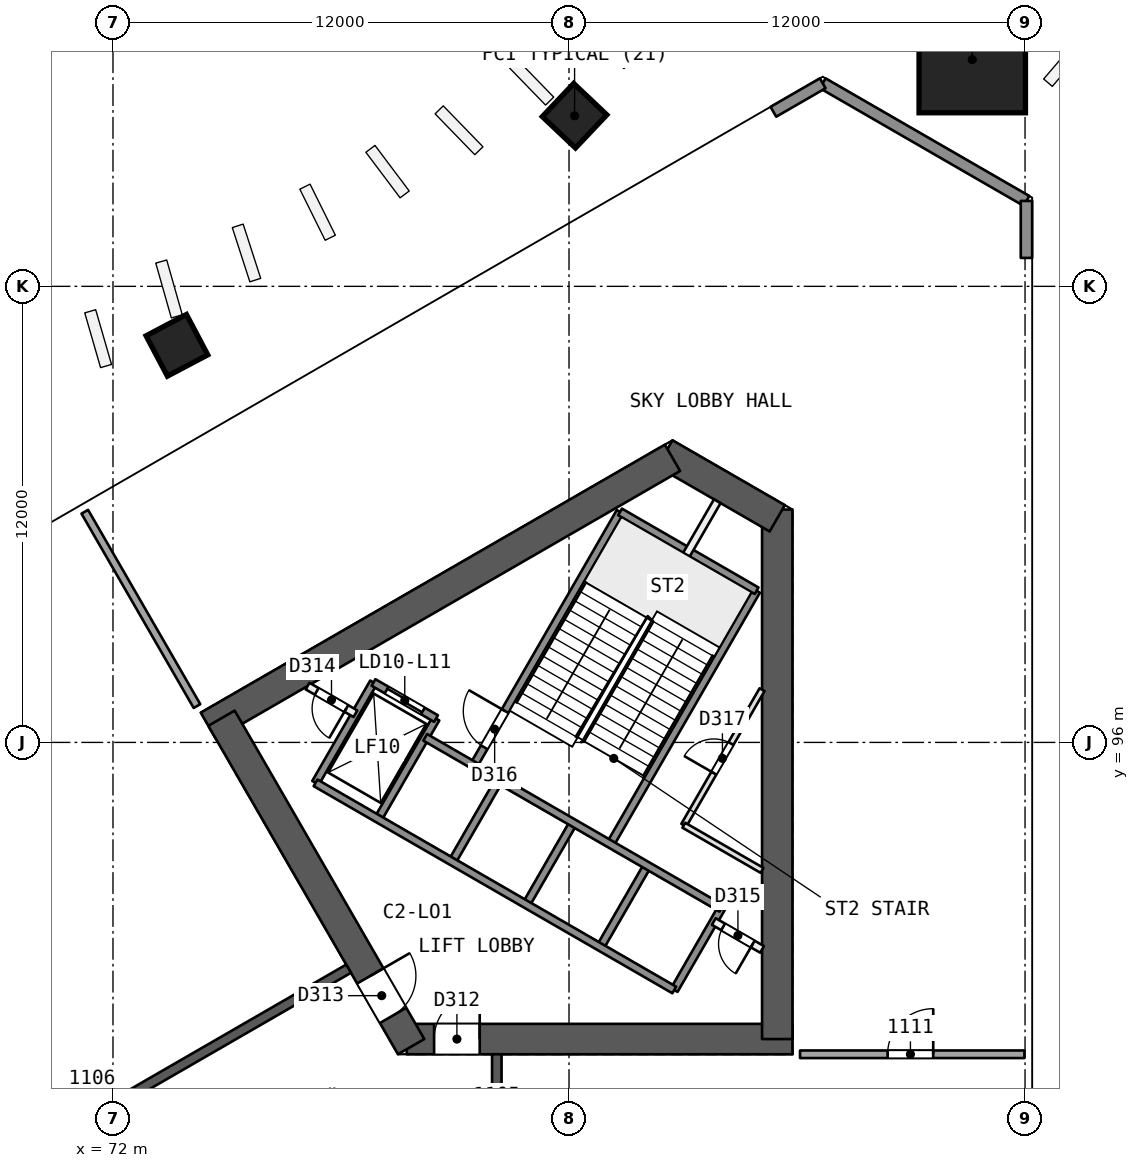
"""IFC4 building model, lengths in metres.
Left out: names, types, materials, properties, quantities, classifications, styles, units other than length and angle.
Written with IfcOpenShell. Run it as: python <this file> out.ifc"""

import sys

from ifc_helpers import new_model, si_unit, direction, frame, frame_2d, origin, origin_2d, place, context, subcontext, project, spatial, rectangle, extrude, element, fill, save


model = new_model("IFC4")
c1 = context("Model", 3, precision=1e-05, world=origin(), true_north=direction((0.0, 1.0)))
c2 = subcontext(c1, "Body", "Model", "MODEL_VIEW")
j1 = project(units=[si_unit("LENGTHUNIT", "METRE"), si_unit("PLANEANGLEUNIT", "RADIAN")], contexts=[c1])
p1 = place(None, origin())
s1 = spatial("IfcSite", under=j1, at=p1, CompositionType="ELEMENT")
p2 = place(p1, origin())
s2 = spatial("IfcBuilding", under=s1, at=p2, CompositionType="ELEMENT")
p3 = place(p2, frame((0.0, 0.0, 52.9)))
s3 = spatial("IfcBuildingStorey", under=s2, at=p3, CompositionType="ELEMENT", Elevation=52.9)
p4 = place(p3, frame((79.731, 88.194, 0.0), z_axis=(0.0, 0.0, 1.0), x_axis=(1.0, 0.0, 0.0)))
e1 = element("IfcWall", 1, at=p4, inside=s3, PredefinedType="SHEAR", context=c2, shape_type="SweptSolid", body=[
    extrude(rectangle(XDim=10.149, YDim=0.8, at=frame_2d((5.074, 0.0))), origin(), (0.0, 0.0, 1.0), 4.4),
])
p5 = place(p4, frame((0.719, 0.0, 0.0)))
e2 = element("IfcOpeningElement", 2, at=p5, cuts=e1, PredefinedType="OPENING", context=c2, shape_type="SweptSolid", body=[
    extrude(rectangle(XDim=1.2, YDim=2.1, at=frame_2d((0.6, 1.05))), frame((0.0, 0.411, 0.0), z_axis=(0.0, -1.0, 0.0), x_axis=(1.0, 0.0, 0.0)), (0.0, 0.0, 1.0), 0.821),
])
p6 = place(p3, frame((89.48, 88.194, 0.0), z_axis=(0.0, 0.0, 1.0), x_axis=(0.0, 1.0, 0.0)))
e3 = element("IfcWall", 3, at=p6, inside=s3, PredefinedType="SHEAR", context=c2, shape_type="SweptSolid", body=[
    extrude(rectangle(XDim=13.933, YDim=0.8, at=frame_2d((6.967, 0.0))), origin(), (0.0, 0.0, 1.0), 4.4),
])
p7 = place(p3, frame((89.48, 101.897, 0.0), z_axis=(0.0, 0.0, 1.0), x_axis=(-0.866034355626, 0.499984494636, 0.0)))
e4 = element("IfcWall", 4, at=p7, inside=s3, PredefinedType="SHEAR", context=c2, shape_type="SweptSolid", body=[
    extrude(rectangle(XDim=3.414, YDim=0.8, at=frame_2d((1.707, 0.0))), origin(), (0.0, 0.0, 1.0), 4.4),
])
p8 = place(p3, frame((86.723, 103.488, 0.0), z_axis=(0.0, 0.0, 1.0), x_axis=(-0.866032504327, -0.499987701298, 0.0)))
e5 = element("IfcWall", 5, at=p8, inside=s3, PredefinedType="SHEAR", context=c2, shape_type="SweptSolid", body=[
    extrude(rectangle(XDim=14.102, YDim=0.8, at=frame_2d((7.051, 0.0))), origin(), (0.0, 0.0, 1.0), 4.4),
])
p9 = place(p3, frame((74.856, 96.637, 0.0), z_axis=(0.0, 0.0, 1.0), x_axis=(0.499993500917, -0.866029155999, 0.0)))
e6 = element("IfcWall", 6, at=p9, inside=s3, PredefinedType="SHEAR", context=c2, shape_type="SweptSolid", body=[
    extrude(rectangle(XDim=9.98, YDim=0.8, at=frame_2d((4.99, 0.0))), origin(), (0.0, 0.0, 1.0), 4.4),
])
p10 = place(p9, frame((7.83, 0.0, 0.0)))
e7 = element("IfcOpeningElement", 7, at=p10, cuts=e6, PredefinedType="OPENING", context=c2, shape_type="SweptSolid", body=[
    extrude(rectangle(XDim=1.2, YDim=2.1, at=frame_2d((0.6, 1.05))), frame((0.0, 0.411, 0.0), z_axis=(0.0, -1.0, 0.0), x_axis=(1.0, 0.0, 0.0)), (0.0, 0.0, 1.0), 0.821),
])
p11 = place(p3, frame((82.1, 72.206, 0.0), z_axis=(0.0, 0.0, 1.0), x_axis=(0.0, 1.0, 0.0)))
e8 = element("IfcWall", 8, at=p11, inside=s3, PredefinedType="SHEAR", context=c2, shape_type="SweptSolid", body=[
    extrude(rectangle(XDim=15.588, YDim=0.25, at=frame_2d((7.794, 0.0))), origin(), (0.0, 0.0, 1.0), 3.9),
])
p12 = place(p11, frame((2.518, 0.0, 0.0)))
e9 = element("IfcOpeningElement", 9, at=p12, cuts=e8, PredefinedType="OPENING", context=c2, shape_type="SweptSolid", body=[
    extrude(rectangle(XDim=1.2, YDim=2.4, at=frame_2d((0.6, 1.2))), frame((0.0, 0.135, 0.0), z_axis=(0.0, -1.0, 0.0), x_axis=(1.0, 0.0, 0.0)), (0.0, 0.0, 1.0), 0.271),
])
p13 = place(p11, frame((6.487, 0.0, 0.0)))
e10 = element("IfcOpeningElement", 10, at=p13, cuts=e8, PredefinedType="OPENING", context=c2, shape_type="SweptSolid", body=[
    extrude(rectangle(XDim=0.9, YDim=2.1, at=frame_2d((0.45, 1.05))), frame((0.0, 0.135, 0.0), z_axis=(0.0, -1.0, 0.0), x_axis=(1.0, 0.0, 0.0)), (0.0, 0.0, 1.0), 0.271),
])
p14 = place(p11, frame((7.89, 0.0, 0.0)))
e11 = element("IfcOpeningElement", 11, at=p14, cuts=e8, PredefinedType="OPENING", context=c2, shape_type="SweptSolid", body=[
    extrude(rectangle(XDim=0.9, YDim=2.1, at=frame_2d((0.45, 1.05))), frame((0.0, 0.135, 0.0), z_axis=(0.0, -1.0, 0.0), x_axis=(1.0, 0.0, 0.0)), (0.0, 0.0, 1.0), 0.271),
])
p15 = place(p11, frame((9.527, 0.0, 0.0)))
e12 = element("IfcOpeningElement", 12, at=p15, cuts=e8, PredefinedType="OPENING", context=c2, shape_type="SweptSolid", body=[
    extrude(rectangle(XDim=0.9, YDim=2.1, at=frame_2d((0.45, 1.05))), frame((0.0, 0.135, 0.0), z_axis=(0.0, -1.0, 0.0), x_axis=(1.0, 0.0, 0.0)), (0.0, 0.0, 1.0), 0.271),
])
p16 = place(p11, frame((12.65, 0.0, 0.0)))
e13 = element("IfcOpeningElement", 13, at=p16, cuts=e8, PredefinedType="OPENING", context=c2, shape_type="SweptSolid", body=[
    extrude(rectangle(XDim=1.2, YDim=2.4, at=frame_2d((0.6, 1.2))), frame((0.0, 0.135, 0.0), z_axis=(0.0, -1.0, 0.0), x_axis=(1.0, 0.0, 0.0)), (0.0, 0.0, 1.0), 0.271),
])
p17 = place(p3, frame((78.2, 90.046, 0.0), z_axis=(0.0, 0.0, 1.0), x_axis=(-0.866026492143, -0.499998114903, 0.0)))
e14 = element("IfcWall", 14, at=p17, inside=s3, PredefinedType="SHEAR", context=c2, shape_type="SweptSolid", body=[
    extrude(rectangle(XDim=15.588, YDim=0.25, at=frame_2d((7.794, 0.0))), origin(), (0.0, 0.0, 1.0), 3.9),
])
p18 = place(p17, frame((7.194, 0.0, 0.0)))
e15 = element("IfcOpeningElement", 15, at=p18, cuts=e14, PredefinedType="OPENING", context=c2, shape_type="SweptSolid", body=[
    extrude(rectangle(XDim=1.2, YDim=2.4, at=frame_2d((0.6, 1.2))), frame((0.0, 0.135, 0.0), z_axis=(0.0, -1.0, 0.0), x_axis=(1.0, 0.0, 0.0)), (0.0, 0.0, 1.0), 0.271),
])
p19 = place(p3, frame((94.632, 114.004, 0.0), z_axis=(-0.017577766169, -0.030442251188, 0.99938195475), x_axis=(0.49973347244, 0.865465624969, 0.035152646001)))
e16 = element("IfcColumn", 16, at=p19, inside=s3, PredefinedType="COLUMN", context=c2, shape_type="SweptSolid", body=[
    extrude(rectangle(XDim=2.8, YDim=2.8, at=origin_2d()), origin(), (0.0, 0.0, 1.0), 4.403),
])
p20 = place(p3, frame((84.157, 112.523, 0.0), z_axis=(-0.008374563655, -0.028174028721, 0.999567952062), x_axis=(0.865767069895, 0.499991710759, 0.021346424936)))
e17 = element("IfcColumn", 17, at=p20, inside=s3, PredefinedType="COLUMN", context=c2, shape_type="SweptSolid", body=[
    extrude(rectangle(XDim=1.2, YDim=1.2, at=origin_2d()), origin(), (0.0, 0.0, 1.0), 4.402),
])
p21 = place(p3, frame((73.681, 106.475, 0.0), z_axis=(0.000887523446, -0.022798258525, 0.999739691975), x_axis=(0.865376704776, 0.501008573055, 0.010656854921)))
e18 = element("IfcColumn", 18, at=p21, inside=s3, PredefinedType="COLUMN", context=c2, shape_type="SweptSolid", body=[
    extrude(rectangle(XDim=1.2, YDim=1.2, at=origin_2d()), origin(), (0.0, 0.0, 1.0), 4.401),
])
p22 = place(p3, frame((90.079, 87.794, 0.0), z_axis=(0.0, 0.0, 1.0), x_axis=(1.0, 0.0, 0.0)))
e19 = element("IfcWall", 19, at=p22, inside=s3, PredefinedType="PARTITIONING", context=c2, shape_type="SweptSolid", body=[
    extrude(rectangle(XDim=5.905, YDim=0.2, at=frame_2d((2.952, 0.0))), origin(), (0.0, 0.0, 1.0), 3.9),
])
p23 = place(p22, frame((2.305, 0.0, 0.0)))
e20 = element("IfcOpeningElement", 20, at=p23, cuts=e19, PredefinedType="OPENING", context=c2, shape_type="SweptSolid", body=[
    extrude(rectangle(XDim=1.2, YDim=2.4, at=frame_2d((0.6, 1.2))), frame((0.0, 0.11, 0.0), z_axis=(0.0, -1.0, 0.0), x_axis=(1.0, 0.0, 0.0)), (0.0, 0.0, 1.0), 0.221),
])
p24 = place(p3, frame((71.258, 102.07, 0.0), z_axis=(0.0, 0.0, 1.0), x_axis=(0.49999445743, -0.866028603765, 0.0)))
e21 = element("IfcWall", 21, at=p24, inside=s3, PredefinedType="PARTITIONING", context=c2, shape_type="SweptSolid", body=[
    extrude(rectangle(XDim=5.905, YDim=0.2, at=frame_2d((2.952, 0.0))), origin(), (0.0, 0.0, 1.0), 3.9),
])
p25 = place(p3, frame((90.677, 113.343, 0.0), z_axis=(0.0, 0.0, 1.0), x_axis=(0.866025993994, -0.499998977725, 0.0)))
e22 = element("IfcWall", 22, at=p25, inside=s3, PredefinedType="SOLIDWALL", context=c2, shape_type="SweptSolid", body=[
    extrude(rectangle(XDim=6.19, YDim=0.3, at=frame_2d((3.095, 0.0))), origin(), (0.0, 0.0, 1.0), 3.9),
])
for number, where, z_axis, x_axis in (
    (23, (96.038, 110.248, 0.0), (0.0, 0.0, 1.0), (0.0, -1.0, 0.0)),
    (24, (89.377, 112.593, 0.0), (0.0, 0.0, 1.0), (0.866, 0.5, 0.0)),
):
    element("IfcWall", number, at=place(p3, frame(where, z_axis=z_axis, x_axis=x_axis)), inside=s3, PredefinedType="SOLIDWALL", context=c2, shape_type="SweptSolid", body=[
        extrude(rectangle(XDim=1.5, YDim=0.3, at=frame_2d((0.75, 0.0))), origin(), (0.0, 0.0, 1.0), 3.9),
    ])
p26 = place(p3, frame((86.77, 89.486, 0.0), z_axis=(0.0, 0.0, 1.0), x_axis=(0.499961042966, 0.86604789447, 0.0)))
e25 = element("IfcWall", 25, at=p26, inside=s3, PredefinedType="SOLIDWALL", context=c2, shape_type="SweptSolid", body=[
    extrude(rectangle(XDim=2.48, YDim=0.2, at=frame_2d((1.24, 0.0))), origin(), (0.0, 0.0, 1.0), 3.9),
])
p27 = place(p3, frame((87.021, 93.821, 0.0), z_axis=(0.0, 0.0, 1.0), x_axis=(0.500028662945, 0.866008854593, 0.0)))
e26 = element("IfcWall", 26, at=p27, inside=s3, PredefinedType="PARTITIONING", context=c2, shape_type="SweptSolid", body=[
    extrude(rectangle(XDim=4.118, YDim=0.15, at=frame_2d((2.059, 0.0))), origin(), (0.0, 0.0, 1.0), 3.9),
])
p28 = place(p27, frame((1.582, 0.0, 0.0)))
e27 = element("IfcOpeningElement", 27, at=p28, cuts=e26, PredefinedType="OPENING", context=c2, shape_type="SweptSolid", body=[
    extrude(rectangle(XDim=0.9, YDim=2.1, at=frame_2d((0.45, 1.05))), frame((0.0, 0.085, 0.0), z_axis=(0.0, -1.0, 0.0), x_axis=(1.0, 0.0, 0.0)), (0.0, 0.0, 1.0), 0.171),
])
p29 = place(p3, frame((84.821, 90.611, 0.0), z_axis=(0.0, 0.0, 1.0), x_axis=(0.499961042966, 0.86604789447, 0.0)))
e28 = element("IfcWall", 28, at=p29, inside=s3, PredefinedType="SOLIDWALL", context=c2, shape_type="SweptSolid", body=[
    extrude(rectangle(XDim=2.48, YDim=0.2, at=frame_2d((1.24, 0.0))), origin(), (0.0, 0.0, 1.0), 3.9),
])
p30 = place(p3, frame((85.087, 93.321, 0.0), z_axis=(0.0, 0.0, 1.0), x_axis=(0.500019787375, 0.866013979237, 0.0)))
e29 = element("IfcWall", 29, at=p30, inside=s3, PredefinedType="SOLIDWALL", context=c2, shape_type="SweptSolid", body=[
    extrude(rectangle(XDim=7.7, YDim=0.2, at=frame_2d((3.85, 0.0))), origin(), (0.0, 0.0, 1.0), 3.9),
])
p31 = place(p3, frame((82.873, 91.736, 0.0), z_axis=(0.0, 0.0, 1.0), x_axis=(0.499961042966, 0.86604789447, 0.0)))
e30 = element("IfcWall", 30, at=p31, inside=s3, PredefinedType="SOLIDWALL", context=c2, shape_type="SweptSolid", body=[
    extrude(rectangle(XDim=2.48, YDim=0.2, at=frame_2d((1.24, 0.0))), origin(), (0.0, 0.0, 1.0), 3.9),
])
p32 = place(p3, frame((87.09, 100.94, 0.0), z_axis=(0.0, 0.0, 1.0), x_axis=(0.499956811548, 0.866050337213, 0.0)))
e31 = element("IfcWall", 31, at=p32, inside=s3, PredefinedType="PARTITIONING", context=c2, shape_type="SweptSolid", body=[
    extrude(rectangle(XDim=1.623, YDim=0.2, at=frame_2d((0.812, 0.0))), origin(), (0.0, 0.0, 1.0), 3.9),
])
p33 = place(p3, frame((80.924, 92.861, 0.0), z_axis=(0.0, 0.0, 1.0), x_axis=(0.499961042966, 0.86604789447, 0.0)))
e32 = element("IfcWall", 32, at=p33, inside=s3, PredefinedType="SOLIDWALL", context=c2, shape_type="SweptSolid", body=[
    extrude(rectangle(XDim=2.48, YDim=0.2, at=frame_2d((1.24, 0.0))), origin(), (0.0, 0.0, 1.0), 3.9),
])
p34 = place(p3, frame((81.493, 95.396, 0.0), z_axis=(0.0, 0.0, 1.0), x_axis=(0.500006057782, 0.866021906294, 0.0)))
e33 = element("IfcWall", 33, at=p34, inside=s3, PredefinedType="SOLIDWALL", context=c2, shape_type="SweptSolid", body=[
    extrude(rectangle(XDim=7.7, YDim=0.2, at=frame_2d((3.85, 0.0))), origin(), (0.0, 0.0, 1.0), 3.9),
])
p35 = place(p34, frame((0.55, 0.0, 0.0)))
e34 = element("IfcOpeningElement", 34, at=p35, cuts=e33, PredefinedType="OPENING", context=c2, shape_type="SweptSolid", body=[
    extrude(rectangle(XDim=1.1, YDim=2.1, at=frame_2d((0.55, 1.05))), frame((0.0, 0.11, 0.0), z_axis=(0.0, -1.0, 0.0), x_axis=(1.0, 0.0, 0.0)), (0.0, 0.0, 1.0), 0.221),
])
for number, where, z_axis, x_axis in (
    (35, (78.976, 93.986, 0.0), (0.0, 0.0, 1.0), (0.5, 0.866, 0.0)),
    (36, (77.33, 94.936, 0.0), (0.0, 0.0, 1.0), (0.5, 0.866, 0.0)),
):
    element("IfcWall", number, at=place(p3, frame(where, z_axis=z_axis, x_axis=x_axis)), inside=s3, PredefinedType="SOLIDWALL", context=c2, shape_type="SweptSolid", body=[
        extrude(rectangle(XDim=3.05, YDim=0.2, at=frame_2d((1.525, 0.0))), origin(), (0.0, 0.0, 1.0), 3.9),
    ])
p36 = place(p3, frame((86.77, 89.486, 0.0), z_axis=(0.0, 0.0, 1.0), x_axis=(-0.86601811187, 0.500012629753, 0.0)))
e37 = element("IfcWall", 37, at=p36, inside=s3, PredefinedType="SOLIDWALL", context=c2, shape_type="SweptSolid", body=[
    extrude(rectangle(XDim=10.9, YDim=0.2, at=frame_2d((5.45, 0.0))), origin(), (0.0, 0.0, 1.0), 3.9),
])
p37 = place(p3, frame((89.08, 90.554, 0.0), z_axis=(0.0, 0.0, 1.0), x_axis=(-0.866022048785, 0.500005810984, 0.0)))
e38 = element("IfcWall", 38, at=p37, inside=s3, PredefinedType="PARTITIONING", context=c2, shape_type="SweptSolid", body=[
    extrude(rectangle(XDim=1.467, YDim=0.2, at=frame_2d((0.733, 0.0))), origin(), (0.0, 0.0, 1.0), 3.9),
])
p38 = place(p37, frame((0.283, 0.0, 0.0)))
e39 = element("IfcOpeningElement", 39, at=p38, cuts=e38, PredefinedType="OPENING", context=c2, shape_type="SweptSolid", body=[
    extrude(rectangle(XDim=0.9, YDim=2.1, at=frame_2d((0.45, 1.05))), frame((0.0, 0.11, 0.0), z_axis=(0.0, -1.0, 0.0), x_axis=(1.0, 0.0, 0.0)), (0.0, 0.0, 1.0), 0.221),
])
p39 = place(p3, frame((78.38, 96.755, 0.0), z_axis=(0.0, 0.0, 1.0), x_axis=(-0.866003949776, 0.500037157592, 0.0)))
e40 = element("IfcWall", 40, at=p39, inside=s3, PredefinedType="PARTITIONING", context=c2, shape_type="SweptSolid", body=[
    extrude(rectangle(XDim=1.455, YDim=0.2, at=frame_2d((0.728, 0.0))), origin(), (0.0, 0.0, 1.0), 3.9),
])
p40 = place(p39, frame((0.278, 0.0, 0.0)))
e41 = element("IfcOpeningElement", 41, at=p40, cuts=e40, PredefinedType="OPENING", context=c2, shape_type="SweptSolid", body=[
    extrude(rectangle(XDim=0.9, YDim=2.1, at=frame_2d((0.45, 1.05))), frame((0.0, 0.11, 0.0), z_axis=(0.0, -1.0, 0.0), x_axis=(1.0, 0.0, 0.0)), (0.0, 0.0, 1.0), 0.221),
])
p41 = place(p3, frame((88.01, 91.634, 0.0), z_axis=(0.0, 0.0, 1.0), x_axis=(-0.866024315419, 0.5000018851, 0.0)))
e42 = element("IfcWall", 42, at=p41, inside=s3, PredefinedType="SOLIDWALL", context=c2, shape_type="SweptSolid", body=[
    extrude(rectangle(XDim=9.0, YDim=0.2, at=frame_2d((4.5, 0.0))), origin(), (0.0, 0.0, 1.0), 3.9),
])
p42 = place(p3, frame((80.5, 96.627, 0.0), z_axis=(0.0, 0.0, 1.0), x_axis=(-0.86601224135, 0.500022797313, 0.0)))
e43 = element("IfcWall", 43, at=p42, inside=s3, PredefinedType="SOLIDWALL", context=c2, shape_type="SweptSolid", body=[
    extrude(rectangle(XDim=1.9, YDim=0.2, at=frame_2d((0.95, 0.0))), origin(), (0.0, 0.0, 1.0), 3.9),
])
p43 = place(p42, frame((0.4, 0.0, 0.0)))
e44 = element("IfcOpeningElement", 44, at=p43, cuts=e43, PredefinedType="OPENING", context=c2, shape_type="SweptSolid", body=[
    extrude(rectangle(XDim=1.1, YDim=2.1, at=frame_2d((0.55, 1.05))), frame((0.0, 0.11, 0.0), z_axis=(0.0, -1.0, 0.0), x_axis=(1.0, 0.0, 0.0)), (0.0, 0.0, 1.0), 0.221),
])
p44 = place(p3, frame((89.08, 92.632, 0.0), z_axis=(0.0, 0.0, 1.0), x_axis=(-0.866041951395, 0.499971337603, 0.0)))
e45 = element("IfcWall", 45, at=p44, inside=s3, PredefinedType="PARTITIONING", context=c2, shape_type="SweptSolid", body=[
    extrude(rectangle(XDim=2.378, YDim=0.15, at=frame_2d((1.189, 0.0))), origin(), (0.0, 0.0, 1.0), 3.9),
])
p45 = place(p3, frame((88.937, 99.99, 0.0), z_axis=(0.0, 0.0, 1.0), x_axis=(-0.866004344652, 0.500036473714, 0.0)))
e46 = element("IfcWall", 46, at=p45, inside=s3, PredefinedType="SOLIDWALL", context=c2, shape_type="SweptSolid", body=[
    extrude(rectangle(XDim=4.15, YDim=0.2, at=frame_2d((2.075, 0.0))), origin(), (0.0, 0.0, 1.0), 3.9),
])
p46 = place(p23, origin())
e47 = element("IfcDoor", 47, at=p46, inside=s3, OperationType="SINGLE_SWING_RIGHT", PredefinedType="NOTDEFINED", context=c2, shape_type="SweptSolid", body=[
    extrude(rectangle(XDim=1.2, YDim=2.4, at=frame_2d((0.6, 1.2))), frame((0.0, 0.025, 0.0), z_axis=(0.0, -1.0, 0.0), x_axis=(1.0, 0.0, 0.0)), (0.0, 0.0, 1.0), 0.05),
])
fill(e20, e47)
p47 = place(p5, origin())
e48 = element("IfcDoor", 48, at=p47, inside=s3, OperationType="SINGLE_SWING_RIGHT", PredefinedType="NOTDEFINED", context=c2, shape_type="SweptSolid", body=[
    extrude(rectangle(XDim=1.2, YDim=2.1, at=frame_2d((0.6, 1.05))), frame((0.0, 0.025, 0.0), z_axis=(0.0, -1.0, 0.0), x_axis=(1.0, 0.0, 0.0)), (0.0, 0.0, 1.0), 0.05),
])
fill(e2, e48)
p48 = place(p10, origin())
e49 = element("IfcDoor", 49, at=p48, inside=s3, OperationType="SINGLE_SWING_LEFT", PredefinedType="NOTDEFINED", context=c2, shape_type="SweptSolid", body=[
    extrude(rectangle(XDim=1.2, YDim=2.1, at=frame_2d((0.6, 1.05))), frame((0.0, 0.025, 0.0), z_axis=(0.0, -1.0, 0.0), x_axis=(1.0, 0.0, 0.0)), (0.0, 0.0, 1.0), 0.05),
])
fill(e7, e49)
p49 = place(p43, origin())
e50 = element("IfcDoor", 50, at=p49, inside=s3, OperationType="SLIDING_TO_RIGHT", PredefinedType="NOTDEFINED", context=c2, shape_type="SweptSolid", body=[
    extrude(rectangle(XDim=1.1, YDim=2.1, at=frame_2d((0.55, 1.05))), frame((0.0, 0.025, 0.0), z_axis=(0.0, -1.0, 0.0), x_axis=(1.0, 0.0, 0.0)), (0.0, 0.0, 1.0), 0.05),
])
fill(e44, e50)
p50 = place(p40, origin())
e51 = element("IfcDoor", 51, at=p50, inside=s3, OperationType="SINGLE_SWING_LEFT", PredefinedType="NOTDEFINED", context=c2, shape_type="SweptSolid", body=[
    extrude(rectangle(XDim=0.9, YDim=2.1, at=frame_2d((0.45, 1.05))), frame((0.0, 0.025, 0.0), z_axis=(0.0, -1.0, 0.0), x_axis=(1.0, 0.0, 0.0)), (0.0, 0.0, 1.0), 0.05),
])
fill(e41, e51)
p51 = place(p38, origin())
e52 = element("IfcDoor", 52, at=p51, inside=s3, OperationType="SINGLE_SWING_LEFT", PredefinedType="NOTDEFINED", context=c2, shape_type="SweptSolid", body=[
    extrude(rectangle(XDim=0.9, YDim=2.1, at=frame_2d((0.45, 1.05))), frame((0.0, 0.025, 0.0), z_axis=(0.0, -1.0, 0.0), x_axis=(1.0, 0.0, 0.0)), (0.0, 0.0, 1.0), 0.05),
])
fill(e39, e52)
p52 = place(p35, origin())
e53 = element("IfcDoor", 53, at=p52, inside=s3, OperationType="SINGLE_SWING_RIGHT", PredefinedType="NOTDEFINED", context=c2, shape_type="SweptSolid", body=[
    extrude(rectangle(XDim=1.1, YDim=2.1, at=frame_2d((0.55, 1.05))), frame((0.0, 0.025, 0.0), z_axis=(0.0, -1.0, 0.0), x_axis=(1.0, 0.0, 0.0)), (0.0, 0.0, 1.0), 0.05),
])
fill(e34, e53)
p53 = place(p28, origin())
e54 = element("IfcDoor", 54, at=p53, inside=s3, OperationType="SINGLE_SWING_LEFT", PredefinedType="NOTDEFINED", context=c2, shape_type="SweptSolid", body=[
    extrude(rectangle(XDim=0.9, YDim=2.1, at=frame_2d((0.45, 1.05))), frame((0.0, 0.025, 0.0), z_axis=(0.0, -1.0, 0.0), x_axis=(1.0, 0.0, 0.0)), (0.0, 0.0, 1.0), 0.05),
])
fill(e27, e54)
save(model, sys.argv[1])
